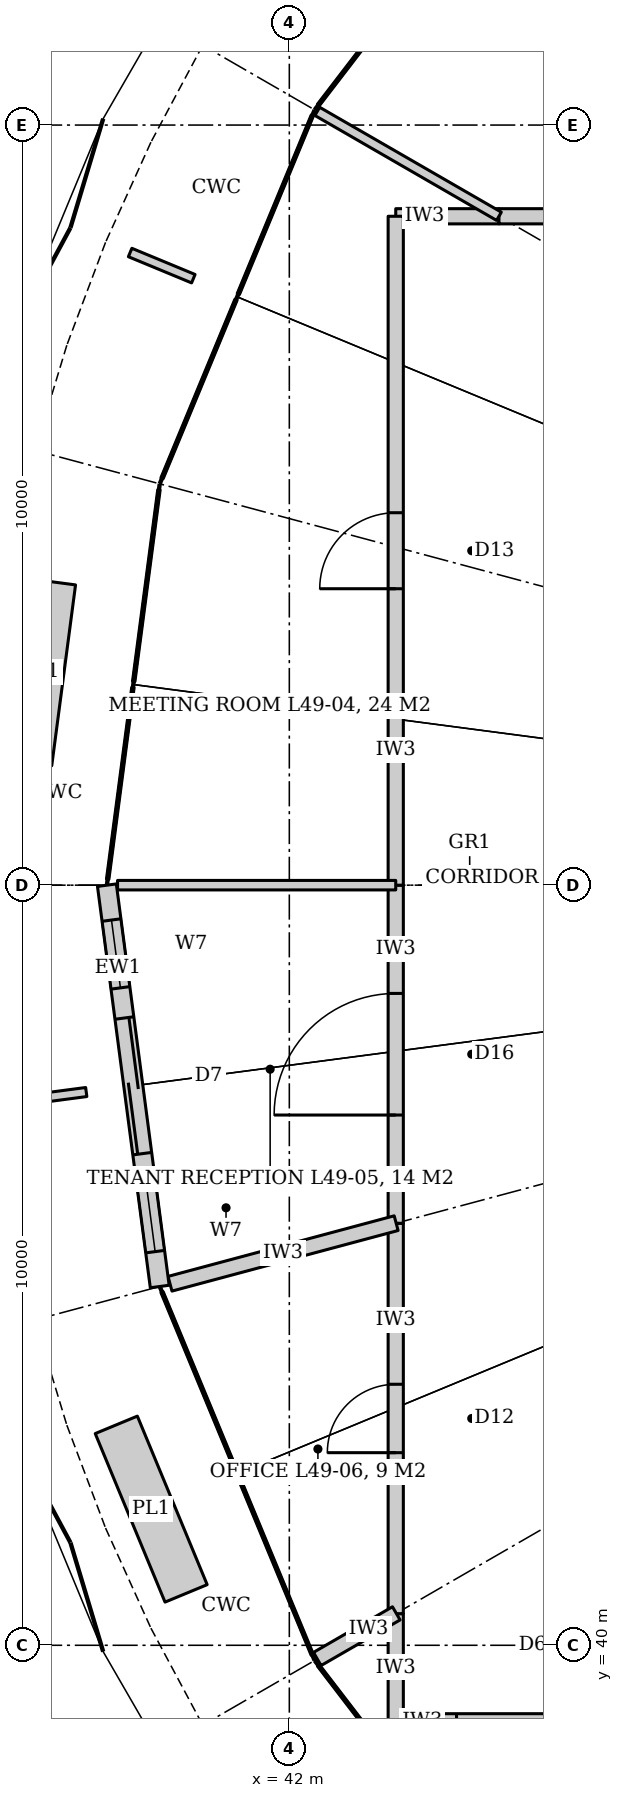
"""IFC4 building model, lengths in metres.
Left out: names, types, materials, properties, quantities, classifications, styles, units other than length and angle.
Written with IfcOpenShell. Run it as: python <this file> out.ifc"""

import sys

from ifc_helpers import new_model, si_unit, direction, frame, frame_2d, origin, place, context, subcontext, project, spatial, rectangle, extrude, element, fill, save


model = new_model("IFC4")
c1 = context("Model", 3, precision=1e-05, world=origin(), true_north=direction((0.0, 1.0)))
c2 = subcontext(c1, "Body", "Model", "MODEL_VIEW")
j1 = project(units=[si_unit("LENGTHUNIT", "METRE"), si_unit("PLANEANGLEUNIT", "RADIAN")], contexts=[c1])
p1 = place(None, origin())
s1 = spatial("IfcSite", under=j1, at=p1, CompositionType="ELEMENT")
p2 = place(p1, origin())
s2 = spatial("IfcBuilding", under=s1, at=p2, CompositionType="ELEMENT")
p3 = place(p2, frame((0.0, 0.0, 215.0)))
s3 = spatial("IfcBuildingStorey", under=s2, at=p3, CompositionType="ELEMENT", Elevation=215.0)
p4 = place(p3, frame((43.4, 58.8, 0.0), z_axis=(0.0, 0.0, 1.0), x_axis=(1.0, 0.0, 0.0)))
e1 = element("IfcWall", 1, at=p4, inside=s3, PredefinedType="PARTITIONING", context=c2, shape_type="SweptSolid", body=[
    extrude(rectangle(XDim=1.358, YDim=0.2, at=frame_2d((0.679, 0.0))), origin(), (0.0, 0.0, 1.0), 3.04),
])
p5 = place(p3, frame((44.758, 58.8, 0.0), z_axis=(0.0, 0.0, 1.0), x_axis=(1.0, 0.0, 0.0)))
e2 = element("IfcWall", 2, at=p5, inside=s3, PredefinedType="PARTITIONING", context=c2, shape_type="SweptSolid", body=[
    extrude(rectangle(XDim=31.842, YDim=0.2, at=frame_2d((15.921, 0.0))), origin(), (0.0, 0.0, 1.0), 3.012),
])
p6 = place(p5, frame((14.921, 0.0, 0.0)))
e3 = element("IfcOpeningElement", 3, at=p6, cuts=e2, PredefinedType="OPENING", context=c2, shape_type="SweptSolid", body=[
    extrude(rectangle(XDim=2.0, YDim=2.1, at=frame_2d((1.0, 1.05))), frame((0.0, 0.11, 0.0), z_axis=(0.0, -1.0, 0.0), x_axis=(1.0, 0.0, 0.0)), (0.0, 0.0, 1.0), 0.22),
])
p7 = place(p3, frame((47.0, 39.0, 0.0), z_axis=(0.0, 0.0, 1.0), x_axis=(-1.0, 0.0, 0.0)))
e4 = element("IfcWall", 4, at=p7, inside=s3, PredefinedType="PARTITIONING", context=c2, shape_type="SweptSolid", body=[
    extrude(rectangle(XDim=3.6, YDim=0.2, at=frame_2d((1.8, 0.0))), origin(), (0.0, 0.0, 1.0), 3.012),
])
p8 = place(p7, frame((0.8, 0.0, 0.0)))
e5 = element("IfcOpeningElement", 5, at=p8, cuts=e4, PredefinedType="OPENING", context=c2, shape_type="SweptSolid", body=[
    extrude(rectangle(XDim=2.0, YDim=2.1, at=frame_2d((1.0, 1.05))), frame((0.0, 0.11, 0.0), z_axis=(0.0, -1.0, 0.0), x_axis=(1.0, 0.0, 0.0)), (0.0, 0.0, 1.0), 0.22),
])
p9 = place(p3, frame((43.4, 39.0, 0.0), z_axis=(0.0, 0.0, 1.0), x_axis=(0.0, 1.0, 0.0)))
e6 = element("IfcWall", 6, at=p9, inside=s3, PredefinedType="PARTITIONING", context=c2, shape_type="SweptSolid", body=[
    extrude(rectangle(XDim=1.416, YDim=0.2, at=frame_2d((0.708, 0.0))), origin(), (0.0, 0.0, 1.0), 3.04),
])
p10 = place(p3, frame((43.4, 40.416, 0.0), z_axis=(0.0, 0.0, 1.0), x_axis=(0.0, 1.0, 0.0)))
e7 = element("IfcWall", 7, at=p10, inside=s3, PredefinedType="PARTITIONING", context=c2, shape_type="SweptSolid", body=[
    extrude(rectangle(XDim=5.136, YDim=0.2, at=frame_2d((2.568, 0.0))), origin(), (0.0, 0.0, 1.0), 3.012),
])
p11 = place(p10, frame((2.118, 0.0, 0.0)))
e8 = element("IfcOpeningElement", 8, at=p11, cuts=e7, PredefinedType="OPENING", context=c2, shape_type="SweptSolid", body=[
    extrude(rectangle(XDim=0.9, YDim=2.4, at=frame_2d((0.45, 1.2))), frame((0.0, 0.11, 0.0), z_axis=(0.0, -1.0, 0.0), x_axis=(1.0, 0.0, 0.0)), (0.0, 0.0, 1.0), 0.22),
])
p12 = place(p3, frame((43.4, 45.552, 0.0), z_axis=(0.0, 0.0, 1.0), x_axis=(0.0, 1.0, 0.0)))
e9 = element("IfcWall", 9, at=p12, inside=s3, PredefinedType="PARTITIONING", context=c2, shape_type="SweptSolid", body=[
    extrude(rectangle(XDim=4.448, YDim=0.2, at=frame_2d((2.224, 0.0))), origin(), (0.0, 0.0, 1.0), 3.012),
])
p13 = place(p12, frame((1.424, 0.0, 0.0)))
e10 = element("IfcOpeningElement", 10, at=p13, cuts=e9, PredefinedType="OPENING", context=c2, shape_type="SweptSolid", body=[
    extrude(rectangle(XDim=1.6, YDim=2.4, at=frame_2d((0.8, 1.2))), frame((0.0, 0.11, 0.0), z_axis=(0.0, -1.0, 0.0), x_axis=(1.0, 0.0, 0.0)), (0.0, 0.0, 1.0), 0.22),
])
p14 = place(p3, frame((43.4, 50.0, 0.0), z_axis=(0.0, 0.0, 1.0), x_axis=(0.0, 1.0, 0.0)))
e11 = element("IfcWall", 11, at=p14, inside=s3, PredefinedType="PARTITIONING", context=c2, shape_type="SweptSolid", body=[
    extrude(rectangle(XDim=8.8, YDim=0.2, at=frame_2d((4.4, 0.0))), origin(), (0.0, 0.0, 1.0), 3.012),
])
p15 = place(p14, frame((3.9, 0.0, 0.0)))
e12 = element("IfcOpeningElement", 12, at=p15, cuts=e11, PredefinedType="OPENING", context=c2, shape_type="SweptSolid", body=[
    extrude(rectangle(XDim=1.0, YDim=2.4, at=frame_2d((0.5, 1.2))), frame((0.0, 0.11, 0.0), z_axis=(0.0, -1.0, 0.0), x_axis=(1.0, 0.0, 0.0)), (0.0, 0.0, 1.0), 0.22),
])
p16 = place(p3, frame((44.758, 58.8, 0.0), z_axis=(0.0, 0.0, 1.0), x_axis=(-0.866057440993, 0.499944505821, 0.0)))
e13 = element("IfcWall", 13, at=p16, inside=s3, PredefinedType="PARTITIONING", context=c2, shape_type="SweptSolid", body=[
    extrude(rectangle(XDim=2.76, YDim=0.125, at=frame_2d((1.38, 0.0))), origin(), (0.0, 0.0, 1.0), 3.04),
])
p17 = place(p3, frame((43.4, 50.0, 0.0), z_axis=(0.0, 0.0, 1.0), x_axis=(-1.0, 0.0, 0.0)))
e14 = element("IfcWall", 14, at=p17, inside=s3, PredefinedType="PARTITIONING", context=c2, shape_type="SweptSolid", body=[
    extrude(rectangle(XDim=3.66, YDim=0.125, at=frame_2d((1.83, 0.0))), origin(), (0.0, 0.0, 1.0), 3.04),
])
p18 = place(p3, frame((43.406, 45.553, 0.0), z_axis=(0.0, 0.0, 1.0), x_axis=(-0.9659303613, -0.258802119616, 0.0)))
e15 = element("IfcWall", 15, at=p18, inside=s3, PredefinedType="PARTITIONING", context=c2, shape_type="SweptSolid", body=[
    extrude(rectangle(XDim=3.08, YDim=0.2, at=frame_2d((1.54, 0.0))), origin(), (0.0, 0.0, 1.0), 3.04),
])
p19 = place(p3, frame((43.407, 40.42, 0.0), z_axis=(0.0, 0.0, 1.0), x_axis=(-0.866094119867, -0.499880961361, 0.0)))
e16 = element("IfcWall", 16, at=p19, inside=s3, PredefinedType="PARTITIONING", context=c2, shape_type="SweptSolid", body=[
    extrude(rectangle(XDim=1.2, YDim=0.2, at=frame_2d((0.6, 0.0))), origin(), (0.0, 0.0, 1.0), 3.04),
])
p20 = place(p3, frame((39.6, 50.0, 0.0), z_axis=(0.0, 0.0, 1.0), x_axis=(0.130514991371, -0.991446335929, 0.0)))
e17 = element("IfcWall", 17, at=p20, inside=s3, PredefinedType="SOLIDWALL", context=c2, shape_type="SweptSolid", body=[
    extrude(rectangle(XDim=5.326, YDim=0.25, at=frame_2d((2.663, 0.0))), origin(), (0.0, 0.0, 1.0), 4.04),
])
p21 = place(p20, frame((1.763, 0.0, 0.0)))
e18 = element("IfcOpeningElement", 18, at=p21, cuts=e17, PredefinedType="OPENING", context=c2, shape_type="SweptSolid", body=[
    extrude(rectangle(XDim=1.8, YDim=2.4, at=frame_2d((0.9, 1.2))), frame((0.0, 0.135, 0.0), z_axis=(0.0, -1.0, 0.0), x_axis=(1.0, 0.0, 0.0)), (0.0, 0.0, 1.0), 0.27),
])
p22 = place(p20, frame((0.463, 0.0, 0.0)))
e19 = element("IfcOpeningElement", 19, at=p22, cuts=e17, PredefinedType="OPENING", context=c2, shape_type="SweptSolid", body=[
    extrude(rectangle(XDim=0.9, YDim=2.4, at=frame_2d((0.45, 1.2))), frame((0.0, 0.135, 0.0), z_axis=(0.0, -1.0, 0.0), x_axis=(1.0, 0.0, 0.0)), (0.0, 0.0, 1.0), 0.27),
])
p23 = place(p20, frame((3.963, 0.0, 0.0)))
e20 = element("IfcOpeningElement", 20, at=p23, cuts=e17, PredefinedType="OPENING", context=c2, shape_type="SweptSolid", body=[
    extrude(rectangle(XDim=0.9, YDim=2.4, at=frame_2d((0.45, 1.2))), frame((0.0, 0.135, 0.0), z_axis=(0.0, -1.0, 0.0), x_axis=(1.0, 0.0, 0.0)), (0.0, 0.0, 1.0), 0.27),
])
p24 = place(p15, origin())
e21 = element("IfcDoor", 21, at=p24, inside=s3, OperationType="SINGLE_SWING_LEFT", PredefinedType="DOOR", context=c2, shape_type="SweptSolid", body=[
    extrude(rectangle(XDim=1.0, YDim=2.4, at=frame_2d((0.5, 1.2))), frame((0.0, 0.025, 0.0), z_axis=(0.0, -1.0, 0.0), x_axis=(1.0, 0.0, 0.0)), (0.0, 0.0, 1.0), 0.05),
])
fill(e12, e21)
p25 = place(p13, origin())
e22 = element("IfcDoor", 22, at=p25, inside=s3, OperationType="DOUBLE_DOOR_DOUBLE_SWING", PredefinedType="DOOR", context=c2, shape_type="SweptSolid", body=[
    extrude(rectangle(XDim=1.6, YDim=2.4, at=frame_2d((0.8, 1.2))), frame((0.0, 0.025, 0.0), z_axis=(0.0, -1.0, 0.0), x_axis=(1.0, 0.0, 0.0)), (0.0, 0.0, 1.0), 0.05),
])
fill(e10, e22)
p26 = place(p11, origin())
e23 = element("IfcDoor", 23, at=p26, inside=s3, OperationType="SINGLE_SWING_LEFT", PredefinedType="DOOR", context=c2, shape_type="SweptSolid", body=[
    extrude(rectangle(XDim=0.9, YDim=2.4, at=frame_2d((0.45, 1.2))), frame((0.0, 0.025, 0.0), z_axis=(0.0, -1.0, 0.0), x_axis=(1.0, 0.0, 0.0)), (0.0, 0.0, 1.0), 0.05),
])
fill(e8, e23)
p27 = place(p21, origin())
e24 = element("IfcDoor", 24, at=p27, inside=s3, OperationType="DOUBLE_DOOR_SLIDING", PredefinedType="DOOR", context=c2, shape_type="SweptSolid", body=[
    extrude(rectangle(XDim=1.8, YDim=2.4, at=frame_2d((0.9, 1.2))), frame((0.0, 0.025, 0.0), z_axis=(0.0, -1.0, 0.0), x_axis=(1.0, 0.0, 0.0)), (0.0, 0.0, 1.0), 0.05),
])
fill(e18, e24)
p28 = place(p22, origin())
e25 = element("IfcWindow", 25, at=p28, inside=s3, PartitioningType="SINGLE_PANEL", PredefinedType="WINDOW", context=c2, shape_type="SweptSolid", body=[
    extrude(rectangle(XDim=0.9, YDim=2.4, at=frame_2d((0.45, 1.2))), frame((0.0, 0.03, 0.0), z_axis=(0.0, -1.0, 0.0), x_axis=(1.0, 0.0, 0.0)), (0.0, 0.0, 1.0), 0.06),
])
fill(e19, e25)
p29 = place(p23, origin())
e26 = element("IfcWindow", 26, at=p29, inside=s3, PartitioningType="SINGLE_PANEL", PredefinedType="WINDOW", context=c2, shape_type="SweptSolid", body=[
    extrude(rectangle(XDim=0.9, YDim=2.4, at=frame_2d((0.45, 1.2))), frame((0.0, 0.03, 0.0), z_axis=(0.0, -1.0, 0.0), x_axis=(1.0, 0.0, 0.0)), (0.0, 0.0, 1.0), 0.06),
])
fill(e20, e26)
save(model, sys.argv[1])
